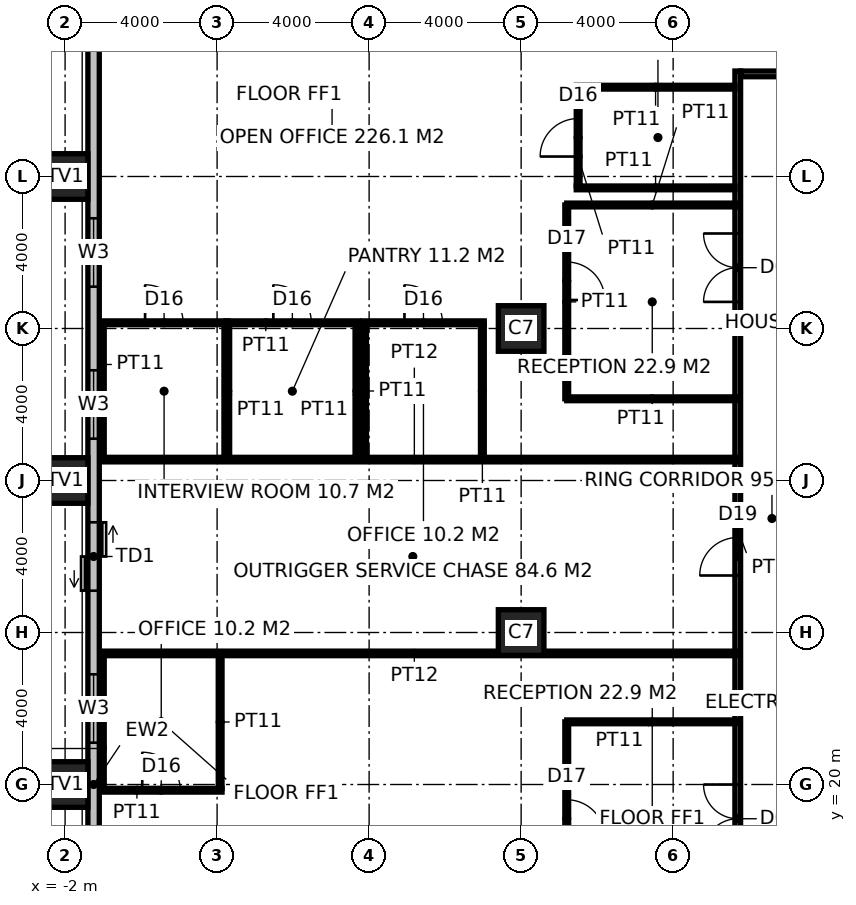
"""IFC4 building model, lengths in metres.
Left out: names, types, materials, properties, quantities, classifications, styles, units other than length and angle.
Written with IfcOpenShell. Run it as: python <this file> out.ifc"""

import sys

from ifc_helpers import new_model, si_unit, direction, frame, frame_2d, origin, origin_2d, place, context, subcontext, project, spatial, rectangle, hollow_rectangle, extrude, element, fill, save


model = new_model("IFC4")
c1 = context("Model", 3, precision=1e-05, world=origin(), true_north=direction((0.0, 1.0)))
c2 = subcontext(c1, "Body", "Model", "MODEL_VIEW")
j1 = project(units=[si_unit("LENGTHUNIT", "METRE"), si_unit("PLANEANGLEUNIT", "RADIAN")], contexts=[c1])
p1 = place(None, origin())
s1 = spatial("IfcSite", under=j1, at=p1, CompositionType="ELEMENT")
p2 = place(p1, origin())
s2 = spatial("IfcBuilding", under=s1, at=p2, CompositionType="ELEMENT")
p3 = place(p2, frame((0.0, 0.0, 11.0)))
s3 = spatial("IfcBuildingStorey", under=s2, at=p3, CompositionType="ELEMENT", Elevation=11.0)
for number, where, z_axis, x_axis in (
    (1, (-2.0, 20.0, 0.0), (0.0, 0.0, 1.0), (1.0, 0.0, 0.0)),
    (2, (-2.0, 28.0, 0.0), (0.0, 0.0, 1.0), (1.0, 0.0, 0.0)),
    (3, (-2.0, 36.0, 0.0), (0.0, 0.0, 1.0), (1.0, 0.0, 0.0)),
):
    element("IfcColumn", number, at=place(p3, frame(where, z_axis=z_axis, x_axis=x_axis)), inside=s3, PredefinedType="USERDEFINED", context=c2, shape_type="SweptSolid", body=[
        extrude(hollow_rectangle(XDim=1.2, YDim=1.2, WallThickness=0.1, at=origin_2d()), origin(), (0.0, 0.0, 1.0), 4.0),
    ])
for number, where, z_axis, x_axis in (
    (4, (10.0, 24.0, 0.0), (0.0, 0.0, 1.0), (1.0, 0.0, 0.0)),
    (5, (10.0, 32.0, 0.0), (0.0, 0.0, 1.0), (1.0, 0.0, 0.0)),
):
    element("IfcColumn", number, at=place(p3, frame(where, z_axis=z_axis, x_axis=x_axis)), inside=s3, PredefinedType="COLUMN", context=c2, shape_type="SweptSolid", body=[
        extrude(hollow_rectangle(XDim=1.2, YDim=1.2, WallThickness=0.1, at=origin_2d()), origin(), (0.0, 0.0, 1.0), 4.0),
    ])
p4 = place(p3, frame((15.7, 14.625, 0.0), z_axis=(0.0, 0.0, 1.0), x_axis=(0.0, 1.0, 0.0)))
e6 = element("IfcWall", 6, at=p4, inside=s3, PredefinedType="PARTITIONING", context=c2, shape_type="SweptSolid", body=[
    extrude(rectangle(XDim=24.15, YDim=0.15, at=frame_2d((12.075, 0.0))), origin(), (0.0, 0.0, 1.0), 3.85),
])
p5 = place(p4, frame((3.574, 0.0, 0.0)))
e7 = element("IfcOpeningElement", 7, at=p5, cuts=e6, PredefinedType="OPENING", context=c2, shape_type="SweptSolid", body=[
    extrude(rectangle(XDim=1.8, YDim=2.4, at=frame_2d((0.9, 1.2))), frame((0.0, 0.085, 0.0), z_axis=(0.0, -1.0, 0.0), x_axis=(1.0, 0.0, 0.0)), (0.0, 0.0, 1.0), 0.17),
])
p6 = place(p4, frame((18.075, 0.0, 0.0)))
e8 = element("IfcOpeningElement", 8, at=p6, cuts=e6, PredefinedType="OPENING", context=c2, shape_type="SweptSolid", body=[
    extrude(rectangle(XDim=1.8, YDim=2.4, at=frame_2d((0.9, 1.2))), frame((0.0, 0.085, 0.0), z_axis=(0.0, -1.0, 0.0), x_axis=(1.0, 0.0, 0.0)), (0.0, 0.0, 1.0), 0.17),
])
p7 = place(p4, frame((10.875, 0.0, 0.0)))
e9 = element("IfcOpeningElement", 9, at=p7, cuts=e6, PredefinedType="OPENING", context=c2, shape_type="SweptSolid", body=[
    extrude(rectangle(XDim=1.0, YDim=2.2, at=frame_2d((0.5, 1.1))), frame((0.0, 0.085, 0.0), z_axis=(0.0, -1.0, 0.0), x_axis=(1.0, 0.0, 0.0)), (0.0, 0.0, 1.0), 0.17),
])
p8 = place(p3, frame((15.775, 38.7, 0.0), z_axis=(0.0, 0.0, 1.0), x_axis=(1.0, 0.0, 0.0)))
e10 = element("IfcWall", 10, at=p8, inside=s3, PredefinedType="PARTITIONING", context=c2, shape_type="SweptSolid", body=[
    extrude(rectangle(XDim=28.45, YDim=0.15, at=frame_2d((14.225, 0.0))), origin(), (0.0, 0.0, 1.0), 3.85),
])
p9 = place(p8, frame((7.975, 0.0, 0.0)))
e11 = element("IfcOpeningElement", 11, at=p9, cuts=e10, PredefinedType="OPENING", context=c2, shape_type="SweptSolid", body=[
    extrude(rectangle(XDim=0.9, YDim=2.1, at=frame_2d((0.45, 1.05))), frame((0.0, 0.085, 0.0), z_axis=(0.0, -1.0, 0.0), x_axis=(1.0, 0.0, 0.0)), (0.0, 0.0, 1.0), 0.17),
])
p10 = place(p8, frame((11.725, 0.0, 0.0)))
e12 = element("IfcOpeningElement", 12, at=p10, cuts=e10, PredefinedType="OPENING", context=c2, shape_type="SweptSolid", body=[
    extrude(rectangle(XDim=1.0, YDim=2.1, at=frame_2d((0.5, 1.05))), frame((0.0, 0.085, 0.0), z_axis=(0.0, -1.0, 0.0), x_axis=(1.0, 0.0, 0.0)), (0.0, 0.0, 1.0), 0.17),
])
p11 = place(p8, frame((15.575, 0.0, 0.0)))
e13 = element("IfcOpeningElement", 13, at=p11, cuts=e10, PredefinedType="OPENING", context=c2, shape_type="SweptSolid", body=[
    extrude(rectangle(XDim=0.9, YDim=2.1, at=frame_2d((0.45, 1.05))), frame((0.0, 0.085, 0.0), z_axis=(0.0, -1.0, 0.0), x_axis=(1.0, 0.0, 0.0)), (0.0, 0.0, 1.0), 0.17),
])
for number, where, z_axis, x_axis in (
    (14, (-1.32, 23.45, 0.0), (0.0, 0.0, 1.0), (1.0, 0.0, 0.0)),
    (15, (-1.32, 28.55, 0.0), (0.0, 0.0, 1.0), (1.0, 0.0, 0.0)),
):
    element("IfcWall", number, at=place(p3, frame(where, z_axis=z_axis, x_axis=x_axis)), inside=s3, PredefinedType="PARTITIONING", context=c2, shape_type="SweptSolid", body=[
        extrude(rectangle(XDim=17.02, YDim=0.12, at=frame_2d((8.51, 0.0))), origin(), (0.0, 0.0, 1.0), 2.65),
    ])
p12 = place(p3, frame((-1.07, 19.85, 0.0), z_axis=(0.0, 0.0, 1.0), x_axis=(1.0, 0.0, 0.0)))
e16 = element("IfcWall", 16, at=p12, inside=s3, PredefinedType="PARTITIONING", context=c2, shape_type="SweptSolid", body=[
    extrude(rectangle(XDim=3.2, YDim=0.1, at=frame_2d((1.6, 0.0))), origin(), (0.0, 0.0, 1.0), 2.65),
])
p13 = place(p12, frame((1.1, 0.0, 0.0)))
e17 = element("IfcOpeningElement", 17, at=p13, cuts=e16, PredefinedType="OPENING", context=c2, shape_type="SweptSolid", body=[
    extrude(rectangle(XDim=1.0, YDim=2.2, at=frame_2d((0.5, 1.1))), frame((0.0, 0.06, 0.0), z_axis=(0.0, -1.0, 0.0), x_axis=(1.0, 0.0, 0.0)), (0.0, 0.0, 1.0), 0.12),
])
p14 = place(p3, frame((-1.07, 32.15, 0.0), z_axis=(0.0, 0.0, 1.0), x_axis=(1.0, 0.0, 0.0)))
e18 = element("IfcWall", 18, at=p14, inside=s3, PredefinedType="PARTITIONING", context=c2, shape_type="SweptSolid", body=[
    extrude(rectangle(XDim=3.35, YDim=0.1, at=frame_2d((1.675, 0.0))), origin(), (0.0, 0.0, 1.0), 2.65),
])
p15 = place(p14, frame((1.175, 0.0, 0.0)))
e19 = element("IfcOpeningElement", 19, at=p15, cuts=e18, PredefinedType="OPENING", context=c2, shape_type="SweptSolid", body=[
    extrude(rectangle(XDim=1.0, YDim=2.2, at=frame_2d((0.5, 1.1))), frame((0.0, 0.06, 0.0), z_axis=(0.0, -1.0, 0.0), x_axis=(1.0, 0.0, 0.0)), (0.0, 0.0, 1.0), 0.12),
])
p16 = place(p3, frame((2.23, 32.15, 0.0), z_axis=(0.0, 0.0, 1.0), x_axis=(1.0, 0.0, 0.0)))
e20 = element("IfcWall", 20, at=p16, inside=s3, PredefinedType="PARTITIONING", context=c2, shape_type="SweptSolid", body=[
    extrude(rectangle(XDim=3.5, YDim=0.1, at=frame_2d((1.75, 0.0))), origin(), (0.0, 0.0, 1.0), 2.65),
])
p17 = place(p16, frame((1.25, 0.0, 0.0)))
e21 = element("IfcOpeningElement", 21, at=p17, cuts=e20, PredefinedType="OPENING", context=c2, shape_type="SweptSolid", body=[
    extrude(rectangle(XDim=1.0, YDim=2.2, at=frame_2d((0.5, 1.1))), frame((0.0, 0.06, 0.0), z_axis=(0.0, -1.0, 0.0), x_axis=(1.0, 0.0, 0.0)), (0.0, 0.0, 1.0), 0.12),
])
p18 = place(p3, frame((5.83, 32.15, 0.0), z_axis=(0.0, 0.0, 1.0), x_axis=(1.0, 0.0, 0.0)))
e22 = element("IfcWall", 22, at=p18, inside=s3, PredefinedType="PARTITIONING", context=c2, shape_type="SweptSolid", body=[
    extrude(rectangle(XDim=3.2, YDim=0.1, at=frame_2d((1.6, 0.0))), origin(), (0.0, 0.0, 1.0), 2.65),
])
p19 = place(p18, frame((1.1, 0.0, 0.0)))
e23 = element("IfcOpeningElement", 23, at=p19, cuts=e22, PredefinedType="OPENING", context=c2, shape_type="SweptSolid", body=[
    extrude(rectangle(XDim=1.0, YDim=2.2, at=frame_2d((0.5, 1.1))), frame((0.0, 0.06, 0.0), z_axis=(0.0, -1.0, 0.0), x_axis=(1.0, 0.0, 0.0)), (0.0, 0.0, 1.0), 0.12),
])
p20 = place(p3, frame((11.45, 35.7, 0.0), z_axis=(0.0, 0.0, 1.0), x_axis=(1.0, 0.0, 0.0)))
e24 = element("IfcWall", 24, at=p20, inside=s3, PredefinedType="PARTITIONING", context=c2, shape_type="SweptSolid", body=[
    extrude(rectangle(XDim=4.175, YDim=0.1, at=frame_2d((2.087, 0.0))), origin(), (0.0, 0.0, 1.0), 2.65),
])
p21 = place(p3, frame((11.45, 38.35, 0.0), z_axis=(0.0, 0.0, 1.0), x_axis=(1.0, 0.0, 0.0)))
e25 = element("IfcWall", 25, at=p21, inside=s3, PredefinedType="PARTITIONING", context=c2, shape_type="SweptSolid", body=[
    extrude(rectangle(XDim=4.175, YDim=0.1, at=frame_2d((2.087, 0.0))), origin(), (0.0, 0.0, 1.0), 3.85),
])
for number, where, z_axis, x_axis in (
    (26, (-1.02, 19.9, 0.0), (0.0, 0.0, 1.0), (0.0, 1.0, 0.0)),
    (27, (-1.02, 28.61, 0.0), (0.0, 0.0, 1.0), (0.0, 1.0, 0.0)),
    (28, (2.08, 19.9, 0.0), (0.0, 0.0, 1.0), (0.0, 1.0, 0.0)),
    (29, (2.23, 28.61, 0.0), (0.0, 0.0, 1.0), (0.0, 1.0, 0.0)),
    (30, (2.28, 28.61, 0.0), (0.0, 0.0, 1.0), (0.0, 1.0, 0.0)),
    (31, (5.68, 28.61, 0.0), (0.0, 0.0, 1.0), (0.0, 1.0, 0.0)),
    (32, (5.88, 28.61, 0.0), (0.0, 0.0, 1.0), (0.0, 1.0, 0.0)),
    (33, (8.98, 28.61, 0.0), (0.0, 0.0, 1.0), (0.0, 1.0, 0.0)),
):
    element("IfcWall", number, at=place(p3, frame(where, z_axis=z_axis, x_axis=x_axis)), inside=s3, PredefinedType="PARTITIONING", context=c2, shape_type="SweptSolid", body=[
        extrude(rectangle(XDim=3.49, YDim=0.1, at=frame_2d((1.745, 0.0))), origin(), (0.0, 0.0, 1.0), 3.85),
    ])
p22 = place(p3, frame((11.5, 35.75, 0.0), z_axis=(0.0, 0.0, 1.0), x_axis=(0.0, 1.0, 0.0)))
e34 = element("IfcWall", 34, at=p22, inside=s3, PredefinedType="PARTITIONING", context=c2, shape_type="SweptSolid", body=[
    extrude(rectangle(XDim=2.55, YDim=0.1, at=frame_2d((1.275, 0.0))), origin(), (0.0, 0.0, 1.0), 3.85),
])
p23 = place(p22, frame((0.775, 0.0, 0.0)))
e35 = element("IfcOpeningElement", 35, at=p23, cuts=e34, PredefinedType="OPENING", context=c2, shape_type="SweptSolid", body=[
    extrude(rectangle(XDim=1.0, YDim=2.2, at=frame_2d((0.5, 1.1))), frame((0.0, 0.06, 0.0), z_axis=(0.0, -1.0, 0.0), x_axis=(1.0, 0.0, 0.0)), (0.0, 0.0, 1.0), 0.12),
])
p24 = place(p3, frame((15.7, 21.649, 0.0), z_axis=(0.0, 0.0, 1.0), x_axis=(-1.0, 0.0, 0.0)))
e36 = element("IfcWall", 36, at=p24, inside=s3, PredefinedType="PARTITIONING", context=c2, shape_type="SweptSolid", body=[
    extrude(rectangle(XDim=4.5, YDim=0.1, at=frame_2d((2.25, 0.0))), origin(), (0.0, 0.0, 1.0), 3.85),
])
p25 = place(p3, frame((11.2, 21.649, 0.0), z_axis=(0.0, 0.0, 1.0), x_axis=(0.0, -1.0, 0.0)))
e37 = element("IfcWall", 37, at=p25, inside=s3, PredefinedType="PARTITIONING", context=c2, shape_type="SweptSolid", body=[
    extrude(rectangle(XDim=5.1, YDim=0.1, at=frame_2d((2.55, 0.0))), origin(), (0.0, 0.0, 1.0), 3.85),
])
p26 = place(p25, frame((2.05, 0.0, 0.0)))
e38 = element("IfcOpeningElement", 38, at=p26, cuts=e37, PredefinedType="OPENING", context=c2, shape_type="SweptSolid", body=[
    extrude(rectangle(XDim=1.0, YDim=2.2, at=frame_2d((0.5, 1.1))), frame((0.0, 0.06, 0.0), z_axis=(0.0, -1.0, 0.0), x_axis=(1.0, 0.0, 0.0)), (0.0, 0.0, 1.0), 0.12),
])
p27 = place(p3, frame((15.7, 35.25, 0.0), z_axis=(0.0, 0.0, 1.0), x_axis=(-1.0, 0.0, 0.0)))
e39 = element("IfcWall", 39, at=p27, inside=s3, PredefinedType="PARTITIONING", context=c2, shape_type="SweptSolid", body=[
    extrude(rectangle(XDim=4.5, YDim=0.1, at=frame_2d((2.25, 0.0))), origin(), (0.0, 0.0, 1.0), 3.85),
])
p28 = place(p3, frame((11.2, 35.25, 0.0), z_axis=(0.0, 0.0, 1.0), x_axis=(0.0, -1.0, 0.0)))
e40 = element("IfcWall", 40, at=p28, inside=s3, PredefinedType="PARTITIONING", context=c2, shape_type="SweptSolid", body=[
    extrude(rectangle(XDim=5.1, YDim=0.1, at=frame_2d((2.55, 0.0))), origin(), (0.0, 0.0, 1.0), 3.85),
])
p29 = place(p28, frame((1.5, 0.0, 0.0)))
e41 = element("IfcOpeningElement", 41, at=p29, cuts=e40, PredefinedType="OPENING", context=c2, shape_type="SweptSolid", body=[
    extrude(rectangle(XDim=1.0, YDim=2.2, at=frame_2d((0.5, 1.1))), frame((0.0, 0.06, 0.0), z_axis=(0.0, -1.0, 0.0), x_axis=(1.0, 0.0, 0.0)), (0.0, 0.0, 1.0), 0.12),
])
p30 = place(p3, frame((11.2, 30.15, 0.0), z_axis=(0.0, 0.0, 1.0), x_axis=(1.0, 0.0, 0.0)))
e42 = element("IfcWall", 42, at=p30, inside=s3, PredefinedType="PARTITIONING", context=c2, shape_type="SweptSolid", body=[
    extrude(rectangle(XDim=4.5, YDim=0.1, at=frame_2d((2.25, 0.0))), origin(), (0.0, 0.0, 1.0), 3.85),
])
p31 = place(p3, frame((-1.25, 40.4, 0.0), z_axis=(0.0, 0.0, 1.0), x_axis=(0.0, -1.0, 0.0)))
e43 = element("IfcWall", 43, at=p31, inside=s3, PredefinedType="ELEMENTEDWALL", context=c2, shape_type="SweptSolid", body=[
    extrude(rectangle(XDim=40.8, YDim=0.3, at=frame_2d((20.4, 0.0))), origin(), (0.0, 0.0, 1.0), 3.85),
])
p32 = place(p31, frame((33.5, 0.0, 0.8)))
e44 = element("IfcOpeningElement", 44, at=p32, cuts=e43, PredefinedType="OPENING", context=c2, shape_type="SweptSolid", body=[
    extrude(rectangle(XDim=1.8, YDim=2.4, at=frame_2d((0.9, 1.2))), frame((0.0, 0.16, 0.0), z_axis=(0.0, -1.0, 0.0), x_axis=(1.0, 0.0, 0.0)), (0.0, 0.0, 1.0), 0.32),
])
p33 = place(p31, frame((29.5, 0.0, 0.0)))
e45 = element("IfcOpeningElement", 45, at=p33, cuts=e43, PredefinedType="OPENING", context=c2, shape_type="SweptSolid", body=[
    extrude(rectangle(XDim=1.8, YDim=2.4, at=frame_2d((0.9, 1.2))), frame((0.0, 0.16, 0.0), z_axis=(0.0, -1.0, 0.0), x_axis=(1.0, 0.0, 0.0)), (0.0, 0.0, 1.0), 0.32),
])
p34 = place(p31, frame((25.5, 0.0, 0.8)))
e46 = element("IfcOpeningElement", 46, at=p34, cuts=e43, PredefinedType="OPENING", context=c2, shape_type="SweptSolid", body=[
    extrude(rectangle(XDim=1.8, YDim=2.4, at=frame_2d((0.9, 1.2))), frame((0.0, 0.16, 0.0), z_axis=(0.0, -1.0, 0.0), x_axis=(1.0, 0.0, 0.0)), (0.0, 0.0, 1.0), 0.32),
])
p35 = place(p31, frame((21.5, 0.0, 0.8)))
e47 = element("IfcOpeningElement", 47, at=p35, cuts=e43, PredefinedType="OPENING", context=c2, shape_type="SweptSolid", body=[
    extrude(rectangle(XDim=1.8, YDim=2.4, at=frame_2d((0.9, 1.2))), frame((0.0, 0.16, 0.0), z_axis=(0.0, -1.0, 0.0), x_axis=(1.0, 0.0, 0.0)), (0.0, 0.0, 1.0), 0.32),
])
p36 = place(p31, frame((17.5, 0.0, 0.8)))
e48 = element("IfcOpeningElement", 48, at=p36, cuts=e43, PredefinedType="OPENING", context=c2, shape_type="SweptSolid", body=[
    extrude(rectangle(XDim=1.8, YDim=2.4, at=frame_2d((0.9, 1.2))), frame((0.0, 0.16, 0.0), z_axis=(0.0, -1.0, 0.0), x_axis=(1.0, 0.0, 0.0)), (0.0, 0.0, 1.0), 0.32),
])
p37 = place(p31, frame((13.5, 0.0, 0.0)))
e49 = element("IfcOpeningElement", 49, at=p37, cuts=e43, PredefinedType="OPENING", context=c2, shape_type="SweptSolid", body=[
    extrude(rectangle(XDim=1.8, YDim=2.4, at=frame_2d((0.9, 1.2))), frame((0.0, 0.16, 0.0), z_axis=(0.0, -1.0, 0.0), x_axis=(1.0, 0.0, 0.0)), (0.0, 0.0, 1.0), 0.32),
])
p38 = place(p31, frame((9.5, 0.0, 0.8)))
e50 = element("IfcOpeningElement", 50, at=p38, cuts=e43, PredefinedType="OPENING", context=c2, shape_type="SweptSolid", body=[
    extrude(rectangle(XDim=1.8, YDim=2.4, at=frame_2d((0.9, 1.2))), frame((0.0, 0.16, 0.0), z_axis=(0.0, -1.0, 0.0), x_axis=(1.0, 0.0, 0.0)), (0.0, 0.0, 1.0), 0.32),
])
p39 = place(p31, frame((5.5, 0.0, 0.8)))
e51 = element("IfcOpeningElement", 51, at=p39, cuts=e43, PredefinedType="OPENING", context=c2, shape_type="SweptSolid", body=[
    extrude(rectangle(XDim=1.8, YDim=2.4, at=frame_2d((0.9, 1.2))), frame((0.0, 0.16, 0.0), z_axis=(0.0, -1.0, 0.0), x_axis=(1.0, 0.0, 0.0)), (0.0, 0.0, 1.0), 0.32),
])
p40 = place(p5, origin())
e52 = element("IfcDoor", 52, at=p40, inside=s3, OperationType="DOUBLE_DOOR_DOUBLE_SWING", PredefinedType="DOOR", context=c2, shape_type="SweptSolid", body=[
    extrude(rectangle(XDim=1.8, YDim=2.4, at=frame_2d((0.9, 1.2))), frame((0.0, 0.025, 0.0), z_axis=(0.0, -1.0, 0.0), x_axis=(1.0, 0.0, 0.0)), (0.0, 0.0, 1.0), 0.05),
])
fill(e7, e52)
p41 = place(p6, origin())
e53 = element("IfcDoor", 53, at=p41, inside=s3, OperationType="DOUBLE_DOOR_DOUBLE_SWING", PredefinedType="DOOR", context=c2, shape_type="SweptSolid", body=[
    extrude(rectangle(XDim=1.8, YDim=2.4, at=frame_2d((0.9, 1.2))), frame((0.0, 0.025, 0.0), z_axis=(0.0, -1.0, 0.0), x_axis=(1.0, 0.0, 0.0)), (0.0, 0.0, 1.0), 0.05),
])
fill(e8, e53)
p42 = place(p7, origin())
e54 = element("IfcDoor", 54, at=p42, inside=s3, OperationType="SINGLE_SWING_LEFT", PredefinedType="DOOR", context=c2, shape_type="SweptSolid", body=[
    extrude(rectangle(XDim=1.0, YDim=2.2, at=frame_2d((0.5, 1.1))), frame((0.0, 0.025, 0.0), z_axis=(0.0, -1.0, 0.0), x_axis=(1.0, 0.0, 0.0)), (0.0, 0.0, 1.0), 0.05),
])
fill(e9, e54)
p43 = place(p13, origin())
e55 = element("IfcDoor", 55, at=p43, inside=s3, OperationType="SINGLE_SWING_LEFT", PredefinedType="DOOR", context=c2, shape_type="SweptSolid", body=[
    extrude(rectangle(XDim=1.0, YDim=2.2, at=frame_2d((0.5, 1.1))), frame((0.0, 0.025, 0.0), z_axis=(0.0, -1.0, 0.0), x_axis=(1.0, 0.0, 0.0)), (0.0, 0.0, 1.0), 0.05),
])
fill(e17, e55)
p44 = place(p15, origin())
e56 = element("IfcDoor", 56, at=p44, inside=s3, OperationType="SINGLE_SWING_LEFT", PredefinedType="DOOR", context=c2, shape_type="SweptSolid", body=[
    extrude(rectangle(XDim=1.0, YDim=2.2, at=frame_2d((0.5, 1.1))), frame((0.0, 0.025, 0.0), z_axis=(0.0, -1.0, 0.0), x_axis=(1.0, 0.0, 0.0)), (0.0, 0.0, 1.0), 0.05),
])
fill(e19, e56)
p45 = place(p17, origin())
e57 = element("IfcDoor", 57, at=p45, inside=s3, OperationType="SINGLE_SWING_LEFT", PredefinedType="DOOR", context=c2, shape_type="SweptSolid", body=[
    extrude(rectangle(XDim=1.0, YDim=2.2, at=frame_2d((0.5, 1.1))), frame((0.0, 0.025, 0.0), z_axis=(0.0, -1.0, 0.0), x_axis=(1.0, 0.0, 0.0)), (0.0, 0.0, 1.0), 0.05),
])
fill(e21, e57)
p46 = place(p23, origin())
e58 = element("IfcDoor", 58, at=p46, inside=s3, OperationType="SINGLE_SWING_LEFT", PredefinedType="DOOR", context=c2, shape_type="SweptSolid", body=[
    extrude(rectangle(XDim=1.0, YDim=2.2, at=frame_2d((0.5, 1.1))), frame((0.0, 0.025, 0.0), z_axis=(0.0, -1.0, 0.0), x_axis=(1.0, 0.0, 0.0)), (0.0, 0.0, 1.0), 0.05),
])
fill(e35, e58)
p47 = place(p19, origin())
e59 = element("IfcDoor", 59, at=p47, inside=s3, OperationType="SINGLE_SWING_LEFT", PredefinedType="DOOR", context=c2, shape_type="SweptSolid", body=[
    extrude(rectangle(XDim=1.0, YDim=2.2, at=frame_2d((0.5, 1.1))), frame((0.0, 0.025, 0.0), z_axis=(0.0, -1.0, 0.0), x_axis=(1.0, 0.0, 0.0)), (0.0, 0.0, 1.0), 0.05),
])
fill(e23, e59)
p48 = place(p26, origin())
e60 = element("IfcDoor", 60, at=p48, inside=s3, OperationType="SINGLE_SWING_RIGHT", PredefinedType="DOOR", context=c2, shape_type="SweptSolid", body=[
    extrude(rectangle(XDim=1.0, YDim=2.2, at=frame_2d((0.5, 1.1))), frame((0.0, 0.025, 0.0), z_axis=(0.0, -1.0, 0.0), x_axis=(1.0, 0.0, 0.0)), (0.0, 0.0, 1.0), 0.05),
])
fill(e38, e60)
p49 = place(p29, origin())
e61 = element("IfcDoor", 61, at=p49, inside=s3, OperationType="SINGLE_SWING_RIGHT", PredefinedType="DOOR", context=c2, shape_type="SweptSolid", body=[
    extrude(rectangle(XDim=1.0, YDim=2.2, at=frame_2d((0.5, 1.1))), frame((0.0, 0.025, 0.0), z_axis=(0.0, -1.0, 0.0), x_axis=(1.0, 0.0, 0.0)), (0.0, 0.0, 1.0), 0.05),
])
fill(e41, e61)
p50 = place(p36, origin())
e62 = element("IfcWindow", 62, at=p50, inside=s3, PartitioningType="SINGLE_PANEL", PredefinedType="WINDOW", context=c2, shape_type="SweptSolid", body=[
    extrude(rectangle(XDim=1.8, YDim=2.4, at=frame_2d((0.9, 1.2))), frame((0.0, 0.03, 0.0), z_axis=(0.0, -1.0, 0.0), x_axis=(1.0, 0.0, 0.0)), (0.0, 0.0, 1.0), 0.06),
])
fill(e48, e62)
p51 = place(p37, origin())
e63 = element("IfcDoor", 63, at=p51, inside=s3, OperationType="DOUBLE_DOOR_SLIDING", PredefinedType="DOOR", context=c2, shape_type="SweptSolid", body=[
    extrude(rectangle(XDim=1.8, YDim=2.4, at=frame_2d((0.9, 1.2))), frame((0.0, 0.025, 0.0), z_axis=(0.0, -1.0, 0.0), x_axis=(1.0, 0.0, 0.0)), (0.0, 0.0, 1.0), 0.05),
])
fill(e49, e63)
p52 = place(p38, origin())
e64 = element("IfcWindow", 64, at=p52, inside=s3, PartitioningType="SINGLE_PANEL", PredefinedType="WINDOW", context=c2, shape_type="SweptSolid", body=[
    extrude(rectangle(XDim=1.8, YDim=2.4, at=frame_2d((0.9, 1.2))), frame((0.0, 0.03, 0.0), z_axis=(0.0, -1.0, 0.0), x_axis=(1.0, 0.0, 0.0)), (0.0, 0.0, 1.0), 0.06),
])
fill(e50, e64)
p53 = place(p39, origin())
e65 = element("IfcWindow", 65, at=p53, inside=s3, PartitioningType="SINGLE_PANEL", PredefinedType="WINDOW", context=c2, shape_type="SweptSolid", body=[
    extrude(rectangle(XDim=1.8, YDim=2.4, at=frame_2d((0.9, 1.2))), frame((0.0, 0.03, 0.0), z_axis=(0.0, -1.0, 0.0), x_axis=(1.0, 0.0, 0.0)), (0.0, 0.0, 1.0), 0.06),
])
fill(e51, e65)
save(model, sys.argv[1])
